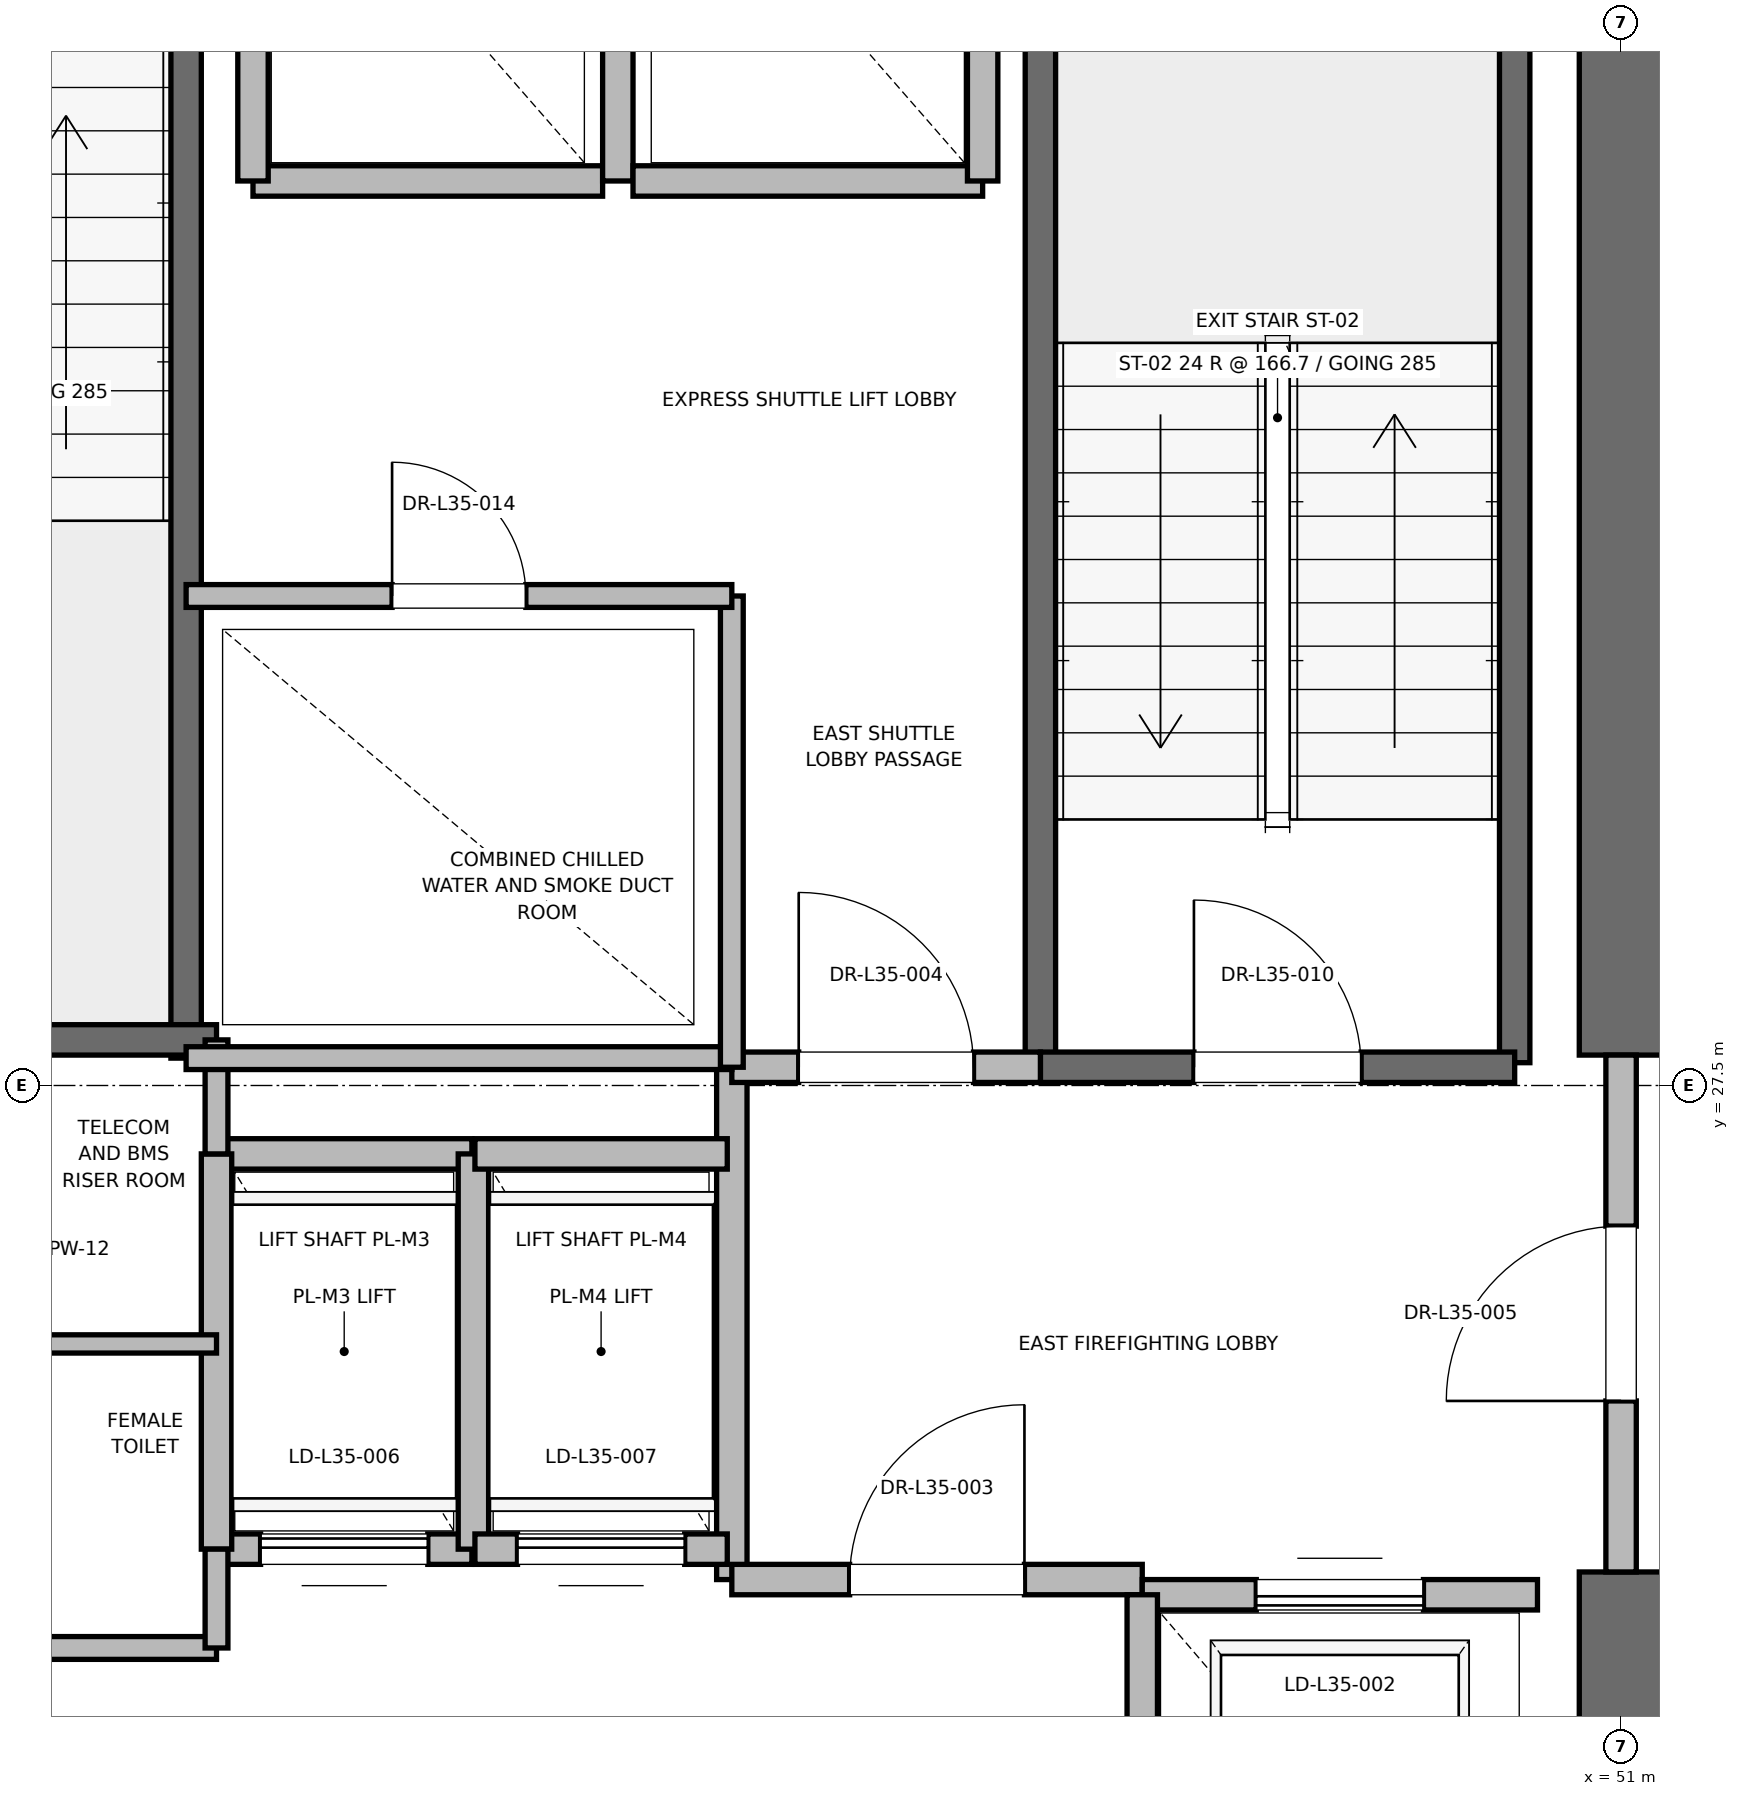
"""IFC4 building model, lengths in metres.
Left out: names, types, materials, properties, quantities, classifications, styles, units other than length and angle.
Written with IfcOpenShell. Run it as: python <this file> out.ifc"""

import sys

from ifc_helpers import new_model, si_unit, direction, frame, frame_2d, origin, place, context, subcontext, project, spatial, rectangle, extrude, element, fill, save


model = new_model("IFC4")
c1 = context("Model", 3, precision=1e-05, world=origin(), true_north=direction((0.0, 1.0)))
c2 = subcontext(c1, "Body", "Model", "MODEL_VIEW")
j1 = project(units=[si_unit("LENGTHUNIT", "METRE"), si_unit("PLANEANGLEUNIT", "RADIAN")], contexts=[c1])
p1 = place(None, origin())
s1 = spatial("IfcSite", under=j1, at=p1, CompositionType="ELEMENT")
p2 = place(p1, origin())
s2 = spatial("IfcBuilding", under=s1, at=p2, CompositionType="ELEMENT")
p3 = place(p2, frame((0.0, 0.0, 152.4)))
s3 = spatial("IfcBuildingStorey", under=s2, at=p3, CompositionType="ELEMENT", Elevation=152.4)
p4 = place(p3, frame((51.0, 18.5, 0.0), z_axis=(0.0, 0.0, 1.0), x_axis=(0.0, 1.0, 0.0)))
e1 = element("IfcWall", 1, at=p4, inside=s3, PredefinedType="SHEAR", context=c2, shape_type="SweptSolid", body=[
    extrude(rectangle(XDim=5.8, YDim=0.55, at=frame_2d((2.9, 0.0))), origin(), (0.0, 0.0, 1.0), 3.775),
])
p5 = place(p3, frame((51.0, 27.7, 0.0), z_axis=(0.0, 0.0, 1.0), x_axis=(0.0, 1.0, 0.0)))
e2 = element("IfcWall", 2, at=p5, inside=s3, PredefinedType="SHEAR", context=c2, shape_type="SweptSolid", body=[
    extrude(rectangle(XDim=8.8, YDim=0.55, at=frame_2d((4.4, 0.0))), origin(), (0.0, 0.0, 1.0), 3.775),
])
p6 = place(p3, frame((50.3, 27.65, 0.0), z_axis=(0.0, 0.0, 1.0), x_axis=(0.0, 1.0, 0.0)))
e3 = element("IfcWall", 3, at=p6, inside=s3, PredefinedType="SOLIDWALL", context=c2, shape_type="SweptSolid", body=[
    extrude(rectangle(XDim=8.15, YDim=0.2, at=frame_2d((4.075, 0.0))), origin(), (0.0, 0.0, 1.0), 3.775),
])
p7 = place(p3, frame((47.18, 27.62, 0.0), z_axis=(0.0, 0.0, 1.0), x_axis=(0.0, 1.0, 0.0)))
e4 = element("IfcWall", 4, at=p7, inside=s3, PredefinedType="SOLIDWALL", context=c2, shape_type="SweptSolid", body=[
    extrude(rectangle(XDim=8.18, YDim=0.2, at=frame_2d((4.09, 0.0))), origin(), (0.0, 0.0, 1.0), 3.775),
])
p8 = place(p3, frame((47.18, 27.62, 0.0), z_axis=(0.0, 0.0, 1.0), x_axis=(1.0, 0.0, 0.0)))
e5 = element("IfcWall", 5, at=p8, inside=s3, PredefinedType="SOLIDWALL", context=c2, shape_type="SweptSolid", body=[
    extrude(rectangle(XDim=3.12, YDim=0.2, at=frame_2d((1.56, 0.0))), origin(), (0.0, 0.0, 1.0), 3.775),
])
p9 = place(p8, frame((1.01, 0.0, 0.0)))
e6 = element("IfcOpeningElement", 6, at=p9, cuts=e5, PredefinedType="OPENING", context=c2, shape_type="SweptSolid", body=[
    extrude(rectangle(XDim=1.1, YDim=2.15, at=frame_2d((0.55, 1.075))), frame((0.0, 0.1, 0.0), z_axis=(0.0, -1.0, 0.0), x_axis=(1.0, 0.0, 0.0)), (0.0, 0.0, 1.0), 0.2),
])
p10 = place(p3, frame((41.56, 27.68, 0.0), z_axis=(0.0, 0.0, 1.0), x_axis=(0.0, 1.0, 0.0)))
e7 = element("IfcWall", 7, at=p10, inside=s3, PredefinedType="SOLIDWALL", context=c2, shape_type="SweptSolid", body=[
    extrude(rectangle(XDim=8.57, YDim=0.2, at=frame_2d((4.285, 0.0))), origin(), (0.0, 0.0, 1.0), 3.775),
])
p11 = place(p3, frame((38.44, 27.8, 0.0), z_axis=(0.0, 0.0, 1.0), x_axis=(1.0, 0.0, 0.0)))
e8 = element("IfcWall", 8, at=p11, inside=s3, PredefinedType="SOLIDWALL", context=c2, shape_type="SweptSolid", body=[
    extrude(rectangle(XDim=3.32, YDim=0.2, at=frame_2d((1.66, 0.0))), origin(), (0.0, 0.0, 1.0), 3.775),
])
p12 = place(p3, frame((45.15, 24.25, 0.0), z_axis=(0.0, 0.0, 1.0), x_axis=(0.0, 1.0, 0.0)))
e9 = element("IfcWall", 9, at=p12, inside=s3, PredefinedType="PARTITIONING", context=c2, shape_type="SweptSolid", body=[
    extrude(rectangle(XDim=3.37, YDim=0.2, at=frame_2d((1.685, 0.0))), origin(), (0.0, 0.0, 1.0), 3.775),
])
p13 = place(p3, frame((45.15, 24.25, 0.0), z_axis=(0.0, 0.0, 1.0), x_axis=(1.0, 0.0, 0.0)))
e10 = element("IfcWall", 10, at=p13, inside=s3, PredefinedType="PARTITIONING", context=c2, shape_type="SweptSolid", body=[
    extrude(rectangle(XDim=2.7, YDim=0.2, at=frame_2d((1.35, 0.0))), origin(), (0.0, 0.0, 1.0), 3.775),
])
p14 = place(p13, frame((0.775, 0.0, 0.0)))
e11 = element("IfcOpeningElement", 11, at=p14, cuts=e10, PredefinedType="OPENING", context=c2, shape_type="SweptSolid", body=[
    extrude(rectangle(XDim=1.15, YDim=2.2, at=frame_2d((0.575, 1.1))), frame((0.0, 0.1, 0.0), z_axis=(0.0, -1.0, 0.0), x_axis=(1.0, 0.0, 0.0)), (0.0, 0.0, 1.0), 0.2),
])
p15 = place(p3, frame((45.15, 27.62, 0.0), z_axis=(0.0, 0.0, 1.0), x_axis=(1.0, 0.0, 0.0)))
e12 = element("IfcWall", 12, at=p15, inside=s3, PredefinedType="PARTITIONING", context=c2, shape_type="SweptSolid", body=[
    extrude(rectangle(XDim=2.03, YDim=0.2, at=frame_2d((1.015, 0.0))), origin(), (0.0, 0.0, 1.0), 3.775),
])
p16 = place(p15, frame((0.44, 0.0, 0.0)))
e13 = element("IfcOpeningElement", 13, at=p16, cuts=e12, PredefinedType="OPENING", context=c2, shape_type="SweptSolid", body=[
    extrude(rectangle(XDim=1.15, YDim=2.2, at=frame_2d((0.575, 1.1))), frame((0.0, 0.1, 0.0), z_axis=(0.0, -1.0, 0.0), x_axis=(1.0, 0.0, 0.0)), (0.0, 0.0, 1.0), 0.2),
])
p17 = place(p3, frame((51.0, 24.3, 0.0), z_axis=(0.0, 0.0, 1.0), x_axis=(0.0, 1.0, 0.0)))
e14 = element("IfcWall", 14, at=p17, inside=s3, PredefinedType="PARTITIONING", context=c2, shape_type="SweptSolid", body=[
    extrude(rectangle(XDim=3.4, YDim=0.2, at=frame_2d((1.7, 0.0))), origin(), (0.0, 0.0, 1.0), 2.755),
])
p18 = place(p17, frame((1.125, 0.0, 0.0)))
e15 = element("IfcOpeningElement", 15, at=p18, cuts=e14, PredefinedType="OPENING", context=c2, shape_type="SweptSolid", body=[
    extrude(rectangle(XDim=1.15, YDim=2.2, at=frame_2d((0.575, 1.1))), frame((0.0, 0.1, 0.0), z_axis=(0.0, -1.0, 0.0), x_axis=(1.0, 0.0, 0.0)), (0.0, 0.0, 1.0), 0.2),
])
p19 = place(p3, frame((50.45, 24.15, 0.0), z_axis=(0.0, 0.0, 1.0), x_axis=(-1.0, 0.0, 0.0)))
e16 = element("IfcWall", 16, at=p19, inside=s3, PredefinedType="SOLIDWALL", context=c2, shape_type="SweptSolid", body=[
    extrude(rectangle(XDim=2.6, YDim=0.2, at=frame_2d((1.3, 0.0))), origin(), (0.0, 0.0, 1.0), 2.755),
])
p20 = place(p19, frame((0.75, 0.0, 0.0)))
e17 = element("IfcOpeningElement", 17, at=p20, cuts=e16, PredefinedType="OPENING", context=c2, shape_type="SweptSolid", body=[
    extrude(rectangle(XDim=1.1, YDim=2.2, at=frame_2d((0.55, 1.1))), frame((0.0, 0.1, 0.0), z_axis=(0.0, -1.0, 0.0), x_axis=(1.0, 0.0, 0.0)), (0.0, 0.0, 1.0), 0.2),
])
p21 = place(p3, frame((47.85, 24.15, 0.0), z_axis=(0.0, 0.0, 1.0), x_axis=(0.0, -1.0, 0.0)))
e18 = element("IfcWall", 18, at=p21, inside=s3, PredefinedType="SOLIDWALL", context=c2, shape_type="SweptSolid", body=[
    extrude(rectangle(XDim=3.0, YDim=0.2, at=frame_2d((1.5, 0.0))), origin(), (0.0, 0.0, 1.0), 3.775),
])
p22 = place(p3, frame((41.76, 24.45, 0.0), z_axis=(0.0, 0.0, 1.0), x_axis=(1.0, 0.0, 0.0)))
e19 = element("IfcWall", 19, at=p22, inside=s3, PredefinedType="SOLIDWALL", context=c2, shape_type="SweptSolid", body=[
    extrude(rectangle(XDim=1.68, YDim=0.2, at=frame_2d((0.84, 0.0))), origin(), (0.0, 0.0, 1.0), 3.775),
])
p23 = place(p22, frame((0.29, 0.0, 0.0)))
e20 = element("IfcOpeningElement", 20, at=p23, cuts=e19, PredefinedType="OPENING", context=c2, shape_type="SweptSolid", body=[
    extrude(rectangle(XDim=1.1, YDim=2.2, at=frame_2d((0.55, 1.1))), frame((0.0, 0.1, 0.0), z_axis=(0.0, -1.0, 0.0), x_axis=(1.0, 0.0, 0.0)), (0.0, 0.0, 1.0), 0.2),
])
p24 = place(p3, frame((43.44, 27.05, 0.0), z_axis=(0.0, 0.0, 1.0), x_axis=(-1.0, 0.0, 0.0)))
e21 = element("IfcWall", 21, at=p24, inside=s3, PredefinedType="SOLIDWALL", context=c2, shape_type="SweptSolid", body=[
    extrude(rectangle(XDim=1.68, YDim=0.2, at=frame_2d((0.84, 0.0))), origin(), (0.0, 0.0, 1.0), 3.775),
])
for number, where, z_axis, x_axis in (
    (22, (41.76, 27.05, 0.0), (0.0, 0.0, 1.0), (0.0, -1.0, 0.0)),
    (23, (43.45, 24.45, 0.0), (0.0, 0.0, 1.0), (0.0, 1.0, 0.0)),
):
    element("IfcWall", number, at=place(p3, frame(where, z_axis=z_axis, x_axis=x_axis)), inside=s3, PredefinedType="SOLIDWALL", context=c2, shape_type="SweptSolid", body=[
        extrude(rectangle(XDim=2.6, YDim=0.2, at=frame_2d((1.3, 0.0))), origin(), (0.0, 0.0, 1.0), 3.775),
    ])
p25 = place(p3, frame((43.46, 24.45, 0.0), z_axis=(0.0, 0.0, 1.0), x_axis=(1.0, 0.0, 0.0)))
e24 = element("IfcWall", 24, at=p25, inside=s3, PredefinedType="SOLIDWALL", context=c2, shape_type="SweptSolid", body=[
    extrude(rectangle(XDim=1.66, YDim=0.2, at=frame_2d((0.83, 0.0))), origin(), (0.0, 0.0, 1.0), 3.775),
])
p26 = place(p25, frame((0.28, 0.0, 0.0)))
e25 = element("IfcOpeningElement", 25, at=p26, cuts=e24, PredefinedType="OPENING", context=c2, shape_type="SweptSolid", body=[
    extrude(rectangle(XDim=1.1, YDim=2.2, at=frame_2d((0.55, 1.1))), frame((0.0, 0.1, 0.0), z_axis=(0.0, -1.0, 0.0), x_axis=(1.0, 0.0, 0.0)), (0.0, 0.0, 1.0), 0.2),
])
p27 = place(p3, frame((45.12, 27.05, 0.0), z_axis=(0.0, 0.0, 1.0), x_axis=(-1.0, 0.0, 0.0)))
e26 = element("IfcWall", 26, at=p27, inside=s3, PredefinedType="SOLIDWALL", context=c2, shape_type="SweptSolid", body=[
    extrude(rectangle(XDim=1.66, YDim=0.2, at=frame_2d((0.83, 0.0))), origin(), (0.0, 0.0, 1.0), 3.775),
])
p28 = place(p3, frame((42.0, 33.45, 0.0), z_axis=(0.0, 0.0, 1.0), x_axis=(1.0, 0.0, 0.0)))
e27 = element("IfcWall", 27, at=p28, inside=s3, PredefinedType="SOLIDWALL", context=c2, shape_type="SweptSolid", body=[
    extrude(rectangle(XDim=2.3, YDim=0.2, at=frame_2d((1.15, 0.0))), origin(), (0.0, 0.0, 1.0), 3.775),
])
for number, where, z_axis, x_axis in (
    (28, (42.0, 36.05, 0.0), (0.0, 0.0, 1.0), (0.0, -1.0, 0.0)),
    (29, (44.4, 33.45, 0.0), (0.0, 0.0, 1.0), (0.0, 1.0, 0.0)),
):
    element("IfcWall", number, at=place(p3, frame(where, z_axis=z_axis, x_axis=x_axis)), inside=s3, PredefinedType="SOLIDWALL", context=c2, shape_type="SweptSolid", body=[
        extrude(rectangle(XDim=2.6, YDim=0.2, at=frame_2d((1.3, 0.0))), origin(), (0.0, 0.0, 1.0), 2.755),
    ])
p29 = place(p3, frame((44.5, 33.45, 0.0), z_axis=(0.0, 0.0, 1.0), x_axis=(1.0, 0.0, 0.0)))
e30 = element("IfcWall", 30, at=p29, inside=s3, PredefinedType="SOLIDWALL", context=c2, shape_type="SweptSolid", body=[
    extrude(rectangle(XDim=2.3, YDim=0.2, at=frame_2d((1.15, 0.0))), origin(), (0.0, 0.0, 1.0), 3.775),
])
p30 = place(p3, frame((46.8, 33.45, 0.0), z_axis=(0.0, 0.0, 1.0), x_axis=(0.0, 1.0, 0.0)))
e31 = element("IfcWall", 31, at=p30, inside=s3, PredefinedType="SOLIDWALL", context=c2, shape_type="SweptSolid", body=[
    extrude(rectangle(XDim=2.6, YDim=0.2, at=frame_2d((1.3, 0.0))), origin(), (0.0, 0.0, 1.0), 3.775),
])
p31 = place(p3, frame((39.95, 23.8, 0.0), z_axis=(0.0, 0.0, 1.0), x_axis=(1.0, 0.0, 0.0)))
e32 = element("IfcWall", 32, at=p31, inside=s3, PredefinedType="PARTITIONING", context=c2, shape_type="SweptSolid", body=[
    extrude(rectangle(XDim=1.81, YDim=0.15, at=frame_2d((0.905, 0.0))), origin(), (0.0, 0.0, 1.0), 2.85),
])
p32 = place(p3, frame((39.95, 25.8, 0.0), z_axis=(0.0, 0.0, 1.0), x_axis=(1.0, 0.0, 0.0)))
e33 = element("IfcWall", 33, at=p32, inside=s3, PredefinedType="PARTITIONING", context=c2, shape_type="SweptSolid", body=[
    extrude(rectangle(XDim=1.81, YDim=0.12, at=frame_2d((0.905, 0.0))), origin(), (0.0, 0.0, 1.0), 2.85),
])
p33 = place(p3, frame((41.76, 23.8, 0.0), z_axis=(0.0, 0.0, 1.0), x_axis=(0.0, 1.0, 0.0)))
e34 = element("IfcWall", 34, at=p33, inside=s3, PredefinedType="PARTITIONING", context=c2, shape_type="SweptSolid", body=[
    extrude(rectangle(XDim=0.65, YDim=0.15, at=frame_2d((0.325, 0.0))), origin(), (0.0, 0.0, 1.0), 2.85),
])
p34 = place(p3, frame((41.76, 27.05, 0.0), z_axis=(0.0, 0.0, 1.0), x_axis=(0.0, 1.0, 0.0)))
e35 = element("IfcWall", 35, at=p34, inside=s3, PredefinedType="PARTITIONING", context=c2, shape_type="SweptSolid", body=[
    extrude(rectangle(XDim=0.75, YDim=0.15, at=frame_2d((0.375, 0.0))), origin(), (0.0, 0.0, 1.0), 2.85),
])
p35 = place(p3, frame((41.56, 27.68, 0.0), z_axis=(0.0, 0.0, 1.0), x_axis=(1.0, 0.0, 0.0)))
e36 = element("IfcWall", 36, at=p35, inside=s3, PredefinedType="PARTITIONING", context=c2, shape_type="SweptSolid", body=[
    extrude(rectangle(XDim=3.59, YDim=0.15, at=frame_2d((1.795, 0.0))), origin(), (0.0, 0.0, 1.0), 2.85),
])
p36 = place(p3, frame((45.15, 27.62, 0.0), z_axis=(0.0, 0.0, 1.0), x_axis=(0.0, 1.0, 0.0)))
e37 = element("IfcWall", 37, at=p36, inside=s3, PredefinedType="PARTITIONING", context=c2, shape_type="SweptSolid", body=[
    extrude(rectangle(XDim=3.1, YDim=0.15, at=frame_2d((1.55, 0.0))), origin(), (0.0, 0.0, 1.0), 2.85),
])
p37 = place(p3, frame((41.56, 30.72, 0.0), z_axis=(0.0, 0.0, 1.0), x_axis=(1.0, 0.0, 0.0)))
e38 = element("IfcWall", 38, at=p37, inside=s3, PredefinedType="PARTITIONING", context=c2, shape_type="SweptSolid", body=[
    extrude(rectangle(XDim=3.59, YDim=0.15, at=frame_2d((1.795, 0.0))), origin(), (0.0, 0.0, 1.0), 2.85),
])
p38 = place(p37, frame((1.355, 0.0, 0.0)))
e39 = element("IfcOpeningElement", 39, at=p38, cuts=e38, PredefinedType="OPENING", context=c2, shape_type="SweptSolid", body=[
    extrude(rectangle(XDim=0.88, YDim=2.1, at=frame_2d((0.44, 1.05))), frame((0.0, 0.075, 0.0), z_axis=(0.0, -1.0, 0.0), x_axis=(1.0, 0.0, 0.0)), (0.0, 0.0, 1.0), 0.15),
])
p39 = place(p9, origin())
e40 = element("IfcDoor", 40, at=p39, inside=s3, OperationType="SINGLE_SWING_LEFT", PredefinedType="DOOR", context=c2, shape_type="SweptSolid", body=[
    extrude(rectangle(XDim=1.1, YDim=2.15, at=frame_2d((0.55, 1.075))), frame((0.0, 0.025, 0.0), z_axis=(0.0, -1.0, 0.0), x_axis=(1.0, 0.0, 0.0)), (0.0, 0.0, 1.0), 0.05),
])
fill(e6, e40)
p40 = place(p14, origin())
e41 = element("IfcDoor", 41, at=p40, inside=s3, OperationType="SINGLE_SWING_RIGHT", PredefinedType="DOOR", context=c2, shape_type="SweptSolid", body=[
    extrude(rectangle(XDim=1.15, YDim=2.2, at=frame_2d((0.575, 1.1))), frame((0.0, 0.025, 0.0), z_axis=(0.0, -1.0, 0.0), x_axis=(1.0, 0.0, 0.0)), (0.0, 0.0, 1.0), 0.05),
])
fill(e11, e41)
p41 = place(p16, origin())
e42 = element("IfcDoor", 42, at=p41, inside=s3, OperationType="SINGLE_SWING_LEFT", PredefinedType="DOOR", context=c2, shape_type="SweptSolid", body=[
    extrude(rectangle(XDim=1.15, YDim=2.2, at=frame_2d((0.575, 1.1))), frame((0.0, 0.025, 0.0), z_axis=(0.0, -1.0, 0.0), x_axis=(1.0, 0.0, 0.0)), (0.0, 0.0, 1.0), 0.05),
])
fill(e13, e42)
p42 = place(p18, origin())
e43 = element("IfcDoor", 43, at=p42, inside=s3, OperationType="SINGLE_SWING_LEFT", PredefinedType="DOOR", context=c2, shape_type="SweptSolid", body=[
    extrude(rectangle(XDim=1.15, YDim=2.2, at=frame_2d((0.575, 1.1))), frame((0.0, 0.025, 0.0), z_axis=(0.0, -1.0, 0.0), x_axis=(1.0, 0.0, 0.0)), (0.0, 0.0, 1.0), 0.05),
])
fill(e15, e43)
p43 = place(p20, origin())
e44 = element("IfcDoor", 44, at=p43, inside=s3, OperationType="SLIDING_TO_RIGHT", PredefinedType="DOOR", context=c2, shape_type="SweptSolid", body=[
    extrude(rectangle(XDim=1.1, YDim=2.2, at=frame_2d((0.55, 1.1))), frame((0.0, 0.025, 0.0), z_axis=(0.0, -1.0, 0.0), x_axis=(1.0, 0.0, 0.0)), (0.0, 0.0, 1.0), 0.05),
])
fill(e17, e44)
p44 = place(p23, origin())
e45 = element("IfcDoor", 45, at=p44, inside=s3, OperationType="SLIDING_TO_RIGHT", PredefinedType="DOOR", context=c2, shape_type="SweptSolid", body=[
    extrude(rectangle(XDim=1.1, YDim=2.2, at=frame_2d((0.55, 1.1))), frame((0.0, 0.025, 0.0), z_axis=(0.0, -1.0, 0.0), x_axis=(1.0, 0.0, 0.0)), (0.0, 0.0, 1.0), 0.05),
])
fill(e20, e45)
p45 = place(p26, origin())
e46 = element("IfcDoor", 46, at=p45, inside=s3, OperationType="SLIDING_TO_RIGHT", PredefinedType="DOOR", context=c2, shape_type="SweptSolid", body=[
    extrude(rectangle(XDim=1.1, YDim=2.2, at=frame_2d((0.55, 1.1))), frame((0.0, 0.025, 0.0), z_axis=(0.0, -1.0, 0.0), x_axis=(1.0, 0.0, 0.0)), (0.0, 0.0, 1.0), 0.05),
])
fill(e25, e46)
p46 = place(p38, origin())
e47 = element("IfcDoor", 47, at=p46, inside=s3, OperationType="SINGLE_SWING_LEFT", PredefinedType="DOOR", context=c2, shape_type="SweptSolid", body=[
    extrude(rectangle(XDim=0.88, YDim=2.1, at=frame_2d((0.44, 1.05))), frame((0.0, 0.025, 0.0), z_axis=(0.0, -1.0, 0.0), x_axis=(1.0, 0.0, 0.0)), (0.0, 0.0, 1.0), 0.05),
])
fill(e39, e47)
save(model, sys.argv[1])
